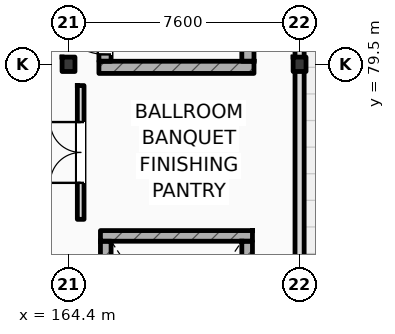
"""IFC4 building model, lengths in metres.
Left out: names, types, materials, properties, quantities, classifications, styles, units other than length and angle.
Written with IfcOpenShell. Run it as: python <this file> out.ifc"""

import sys

from ifc_helpers import new_model, si_unit, direction, frame, frame_2d, origin, origin_2d, place, context, subcontext, project, spatial, rectangle, i_section, extrude, element, fill, save


model = new_model("IFC4")
c1 = context("Model", 3, precision=1e-05, world=origin(), true_north=direction((0.0, 1.0)))
c2 = subcontext(c1, "Body", "Model", "MODEL_VIEW")
j1 = project(units=[si_unit("LENGTHUNIT", "METRE"), si_unit("PLANEANGLEUNIT", "RADIAN")], contexts=[c1])
p1 = place(None, origin())
s1 = spatial("IfcSite", under=j1, at=p1, CompositionType="ELEMENT")
p2 = place(p1, origin())
s2 = spatial("IfcBuilding", under=s1, at=p2, CompositionType="ELEMENT")
p3 = place(p2, origin())
s3 = spatial("IfcBuildingStorey", under=s2, at=p3, CompositionType="ELEMENT", Elevation=0.0)
for number, where, z_axis, x_axis in (
    (1, (164.4, 79.5, 0.0), (0.0, 0.0, 1.0), (1.0, 0.0, 0.0)),
    (2, (172.0, 79.5, 0.0), (0.0, 0.0, 1.0), (1.0, 0.0, 0.0)),
):
    element("IfcColumn", number, at=place(p3, frame(where, z_axis=z_axis, x_axis=x_axis)), inside=s3, PredefinedType="COLUMN", context=c2, shape_type="SweptSolid", body=[
        extrude(i_section(OverallWidth=0.424, OverallDepth=0.474, WebThickness=0.045, FlangeThickness=0.055, FilletRadius=0.015, at=origin_2d()), origin(), (0.0, 0.0, 1.0), 6.0),
    ])
p4 = place(p3, frame((165.4, 79.4, 0.0), z_axis=(0.0, 0.0, 1.0), x_axis=(1.0, 0.0, 0.0)))
e3 = element("IfcWall", 3, at=p4, inside=s3, PredefinedType="SHEAR", context=c2, shape_type="SweptSolid", body=[
    extrude(rectangle(XDim=5.1, YDim=0.4, at=frame_2d((2.55, 0.0))), origin(), (0.0, 0.0, 1.0), 6.0),
])
p5 = place(p3, frame((165.6, 79.6, 0.0), z_axis=(0.0, 0.0, 1.0), x_axis=(0.0, 1.0, 0.0)))
e4 = element("IfcWall", 4, at=p5, inside=s3, PredefinedType="SHEAR", context=c2, shape_type="SweptSolid", body=[
    extrude(rectangle(XDim=8.58, YDim=0.4, at=frame_2d((4.29, 0.0))), origin(), (0.0, 0.0, 1.0), 6.0),
])
p6 = place(p5, frame((0.225, 0.0, 0.0)))
e5 = element("IfcOpeningElement", 5, at=p6, cuts=e4, PredefinedType="OPENING", context=c2, shape_type="SweptSolid", body=[
    extrude(rectangle(XDim=1.6, YDim=2.2, at=frame_2d((0.8, 1.1))), frame((0.0, 0.21, 0.0), z_axis=(0.0, -1.0, 0.0), x_axis=(1.0, 0.0, 0.0)), (0.0, 0.0, 1.0), 0.42),
])
p7 = place(p3, frame((170.3, 79.6, 0.0), z_axis=(0.0, 0.0, 1.0), x_axis=(0.0, 1.0, 0.0)))
e6 = element("IfcWall", 6, at=p7, inside=s3, PredefinedType="SHEAR", context=c2, shape_type="SweptSolid", body=[
    extrude(rectangle(XDim=8.58, YDim=0.4, at=frame_2d((4.29, 0.0))), origin(), (0.0, 0.0, 1.0), 6.0),
])
p8 = place(p3, frame((165.45, 73.855, 0.0), z_axis=(0.0, 0.0, 1.0), x_axis=(1.0, 0.0, 0.0)))
e7 = element("IfcWall", 7, at=p8, inside=s3, PredefinedType="SHEAR", context=c2, shape_type="SweptSolid", body=[
    extrude(rectangle(XDim=5.0, YDim=0.35, at=frame_2d((2.5, 0.0))), origin(), (0.0, 0.0, 1.0), 6.0),
])
for number, where, z_axis, x_axis in (
    (8, (165.625, 65.1, 0.0), (0.0, 0.0, 1.0), (0.0, 1.0, 0.0)),
    (9, (170.275, 65.1, 0.0), (0.0, 0.0, 1.0), (0.0, 1.0, 0.0)),
):
    element("IfcWall", number, at=place(p3, frame(where, z_axis=z_axis, x_axis=x_axis)), inside=s3, PredefinedType="SHEAR", context=c2, shape_type="SweptSolid", body=[
        extrude(rectangle(XDim=8.58, YDim=0.35, at=frame_2d((4.29, 0.0))), origin(), (0.0, 0.0, 1.0), 6.0),
    ])
p9 = place(p3, frame((172.0, 71.0, 0.0), z_axis=(0.0, 0.0, 1.0), x_axis=(0.0, 1.0, 0.0)))
e10 = element("IfcWall", 10, at=p9, inside=s3, PredefinedType="STANDARD", context=c2, shape_type="SweptSolid", body=[
    extrude(rectangle(XDim=8.5, YDim=0.3, at=frame_2d((4.25, 0.0))), origin(), (0.0, 0.0, 1.0), 5.2),
])
p10 = place(p3, frame((172.0, 79.5, 0.0), z_axis=(0.0, 0.0, 1.0), x_axis=(0.0, 1.0, 0.0)))
e11 = element("IfcWall", 11, at=p10, inside=s3, PredefinedType="STANDARD", context=c2, shape_type="SweptSolid", body=[
    extrude(rectangle(XDim=8.5, YDim=0.3, at=frame_2d((4.25, 0.0))), origin(), (0.0, 0.0, 1.0), 5.2),
])
p11 = place(p10, frame((3.2, 0.0, 0.0)))
e12 = element("IfcOpeningElement", 12, at=p11, cuts=e11, PredefinedType="OPENING", context=c2, shape_type="SweptSolid", body=[
    extrude(rectangle(XDim=2.2, YDim=2.5, at=frame_2d((1.1, 1.25))), frame((0.0, 0.16, 0.0), z_axis=(0.0, -1.0, 0.0), x_axis=(1.0, 0.0, 0.0)), (0.0, 0.0, 1.0), 0.32),
])
p12 = place(p3, frame((164.8, 74.4, 0.0), z_axis=(0.0, 0.0, 1.0), x_axis=(0.0, 1.0, 0.0)))
e13 = element("IfcWall", 13, at=p12, inside=s3, PredefinedType="PARTITIONING", context=c2, shape_type="SweptSolid", body=[
    extrude(rectangle(XDim=4.4, YDim=0.22, at=frame_2d((2.2, 0.0))), origin(), (0.0, 0.0, 1.0), 5.7),
])
p13 = place(p12, frame((1.2, 0.0, 0.0)))
e14 = element("IfcOpeningElement", 14, at=p13, cuts=e13, PredefinedType="OPENING", context=c2, shape_type="SweptSolid", body=[
    extrude(rectangle(XDim=2.0, YDim=2.35, at=frame_2d((1.0, 1.175))), frame((0.0, 0.12, 0.0), z_axis=(0.0, -1.0, 0.0), x_axis=(1.0, 0.0, 0.0)), (0.0, 0.0, 1.0), 0.24),
])
p14 = place(p6, origin())
e15 = element("IfcDoor", 15, at=p14, inside=s3, OperationType="SINGLE_SWING_RIGHT", PredefinedType="DOOR", context=c2, shape_type="SweptSolid", body=[
    extrude(rectangle(XDim=1.6, YDim=2.2, at=frame_2d((0.8, 1.1))), frame((0.0, 0.025, 0.0), z_axis=(0.0, -1.0, 0.0), x_axis=(1.0, 0.0, 0.0)), (0.0, 0.0, 1.0), 0.05),
])
fill(e5, e15)
p15 = place(p13, origin())
e16 = element("IfcDoor", 16, at=p15, inside=s3, OperationType="DOUBLE_SWING_LEFT", PredefinedType="DOOR", context=c2, shape_type="SweptSolid", body=[
    extrude(rectangle(XDim=2.0, YDim=2.35, at=frame_2d((1.0, 1.175))), frame((0.0, 0.025, 0.0), z_axis=(0.0, -1.0, 0.0), x_axis=(1.0, 0.0, 0.0)), (0.0, 0.0, 1.0), 0.05),
])
fill(e14, e16)
save(model, sys.argv[1])
